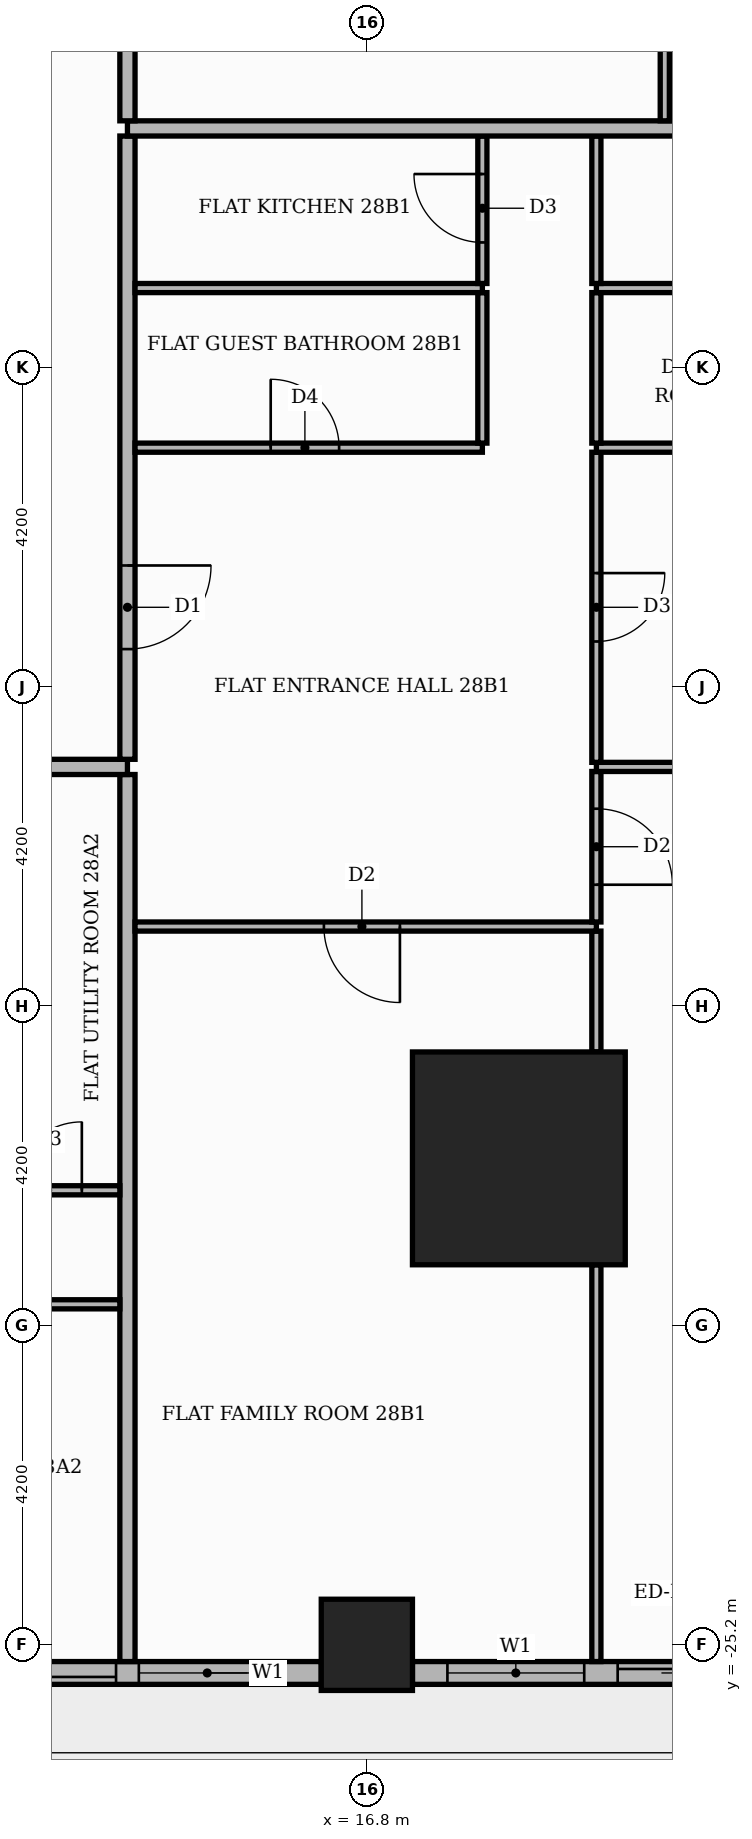
"""IFC4 building model, lengths in metres.
Left out: names, types, materials, properties, quantities, classifications, styles, units other than length and angle.
Written with IfcOpenShell. Run it as: python <this file> out.ifc"""

import sys

from ifc_helpers import new_model, si_unit, direction, frame, frame_2d, origin, origin_2d, place, context, subcontext, project, spatial, rectangle, extrude, element, fill, save


model = new_model("IFC4")
c1 = context("Model", 3, precision=1e-05, world=origin(), true_north=direction((0.0, 1.0)))
c2 = subcontext(c1, "Body", "Model", "MODEL_VIEW")
j1 = project(units=[si_unit("LENGTHUNIT", "METRE"), si_unit("PLANEANGLEUNIT", "RADIAN")], contexts=[c1])
p1 = place(None, origin())
s1 = spatial("IfcSite", under=j1, at=p1, CompositionType="ELEMENT")
p2 = place(p1, origin())
s2 = spatial("IfcBuilding", under=s1, at=p2, CompositionType="ELEMENT")
p3 = place(p2, frame((0.0, 0.0, 118.2)))
s3 = spatial("IfcBuildingStorey", under=s2, at=p3, CompositionType="ELEMENT", Elevation=118.2)
p4 = place(p3, frame((18.8, -18.8, 0.0), z_axis=(0.0, 0.0, 1.0), x_axis=(1.0, 0.0, 0.0)))
e1 = element("IfcColumn", 1, at=p4, inside=s3, PredefinedType="COLUMN", context=c2, shape_type="SweptSolid", body=[
    extrude(rectangle(XDim=2.8, YDim=2.8, at=origin_2d()), origin(), (0.0, 0.0, 1.0), 3.9),
])
p5 = place(p3, frame((16.8, -25.2, 0.0), z_axis=(0.0, 0.0, 1.0), x_axis=(1.0, 0.0, 0.0)))
e2 = element("IfcColumn", 2, at=p5, inside=s3, PredefinedType="COLUMN", context=c2, shape_type="SweptSolid", body=[
    extrude(rectangle(XDim=1.2, YDim=1.2, at=origin_2d()), origin(), (0.0, 0.0, 1.0), 3.9),
])
p6 = place(p3, frame((9.0, -25.57, 0.0), z_axis=(0.0, 0.0, 1.0), x_axis=(1.0, 0.0, 0.0)))
e3 = element("IfcWall", 3, at=p6, inside=s3, PredefinedType="STANDARD", context=c2, shape_type="SweptSolid", body=[
    extrude(rectangle(XDim=7.2, YDim=0.3, at=frame_2d((3.6, 0.0))), origin(), (0.0, 0.0, 1.0), 3.48),
])
p7 = place(p6, frame((0.6, 0.0, 0.0)))
e4 = element("IfcOpeningElement", 4, at=p7, cuts=e3, PredefinedType="OPENING", context=c2, shape_type="SweptSolid", body=[
    extrude(rectangle(XDim=3.9, YDim=2.4, at=frame_2d((1.95, 1.2))), frame((0.0, 0.16, 0.0), z_axis=(0.0, -1.0, 0.0), x_axis=(1.0, 0.0, 0.0)), (0.0, 0.0, 1.0), 0.32),
])
p8 = place(p6, frame((4.8, 0.0, 0.9)))
e5 = element("IfcOpeningElement", 5, at=p8, cuts=e3, PredefinedType="OPENING", context=c2, shape_type="SweptSolid", body=[
    extrude(rectangle(XDim=1.8, YDim=2.1, at=frame_2d((0.9, 1.05))), frame((0.0, 0.16, 0.0), z_axis=(0.0, -1.0, 0.0), x_axis=(1.0, 0.0, 0.0)), (0.0, 0.0, 1.0), 0.32),
])
p9 = place(p3, frame((17.4, -25.57, 0.0), z_axis=(0.0, 0.0, 1.0), x_axis=(1.0, 0.0, 0.0)))
e6 = element("IfcWall", 6, at=p9, inside=s3, PredefinedType="STANDARD", context=c2, shape_type="SweptSolid", body=[
    extrude(rectangle(XDim=4.82, YDim=0.3, at=frame_2d((2.41, 0.0))), origin(), (0.0, 0.0, 1.0), 3.48),
])
p10 = place(p9, frame((2.7, 0.0, 0.0)))
e7 = element("IfcOpeningElement", 7, at=p10, cuts=e6, PredefinedType="OPENING", context=c2, shape_type="SweptSolid", body=[
    extrude(rectangle(XDim=1.8, YDim=2.4, at=frame_2d((0.9, 1.2))), frame((0.0, 0.16, 0.0), z_axis=(0.0, -1.0, 0.0), x_axis=(1.0, 0.0, 0.0)), (0.0, 0.0, 1.0), 0.32),
])
p11 = place(p9, frame((0.46, 0.0, 0.9)))
e8 = element("IfcOpeningElement", 8, at=p11, cuts=e6, PredefinedType="OPENING", context=c2, shape_type="SweptSolid", body=[
    extrude(rectangle(XDim=1.8, YDim=2.1, at=frame_2d((0.9, 1.05))), frame((0.0, 0.16, 0.0), z_axis=(0.0, -1.0, 0.0), x_axis=(1.0, 0.0, 0.0)), (0.0, 0.0, 1.0), 0.32),
])
p12 = place(p3, frame((13.65, -25.42, 0.0), z_axis=(0.0, 0.0, 1.0), x_axis=(0.0, 1.0, 0.0)))
e9 = element("IfcWall", 9, at=p12, inside=s3, PredefinedType="PARTITIONING", context=c2, shape_type="SweptSolid", body=[
    extrude(rectangle(XDim=11.67, YDim=0.2, at=frame_2d((5.835, 0.0))), origin(), (0.0, 0.0, 1.0), 3.48),
])
p13 = place(p3, frame((19.82, -25.42, 0.0), z_axis=(0.0, 0.0, 1.0), x_axis=(0.0, 1.0, 0.0)))
e10 = element("IfcWall", 10, at=p13, inside=s3, PredefinedType="PARTITIONING", context=c2, shape_type="SweptSolid", body=[
    extrude(rectangle(XDim=5.22, YDim=0.12, at=frame_2d((2.61, 0.0))), origin(), (0.0, 0.0, 1.0), 3.48),
])
p14 = place(p3, frame((-5.15, -20.72, 0.0), z_axis=(0.0, 0.0, 1.0), x_axis=(1.0, 0.0, 0.0)))
e11 = element("IfcWall", 11, at=p14, inside=s3, PredefinedType="PARTITIONING", context=c2, shape_type="SweptSolid", body=[
    extrude(rectangle(XDim=18.7, YDim=0.12, at=frame_2d((9.35, 0.0))), origin(), (0.0, 0.0, 1.0), 3.48),
])
p15 = place(p14, frame((3.65, 0.0, 0.0)))
e12 = element("IfcOpeningElement", 12, at=p15, cuts=e11, PredefinedType="OPENING", context=c2, shape_type="SweptSolid", body=[
    extrude(rectangle(XDim=0.9, YDim=2.1, at=frame_2d((0.45, 1.05))), frame((0.0, 0.07, 0.0), z_axis=(0.0, -1.0, 0.0), x_axis=(1.0, 0.0, 0.0)), (0.0, 0.0, 1.0), 0.14),
])
p16 = place(p14, frame((15.15, 0.0, 0.0)))
e13 = element("IfcOpeningElement", 13, at=p16, cuts=e11, PredefinedType="OPENING", context=c2, shape_type="SweptSolid", body=[
    extrude(rectangle(XDim=1.0, YDim=2.1, at=frame_2d((0.5, 1.05))), frame((0.0, 0.07, 0.0), z_axis=(0.0, -1.0, 0.0), x_axis=(1.0, 0.0, 0.0)), (0.0, 0.0, 1.0), 0.14),
])
p17 = place(p3, frame((3.15, -19.22, 0.0), z_axis=(0.0, 0.0, 1.0), x_axis=(1.0, 0.0, 0.0)))
e14 = element("IfcWall", 14, at=p17, inside=s3, PredefinedType="PARTITIONING", context=c2, shape_type="SweptSolid", body=[
    extrude(rectangle(XDim=10.4, YDim=0.12, at=frame_2d((5.2, 0.0))), origin(), (0.0, 0.0, 1.0), 3.48),
])
p18 = place(p17, frame((2.7, 0.0, 0.0)))
e15 = element("IfcOpeningElement", 15, at=p18, cuts=e14, PredefinedType="OPENING", context=c2, shape_type="SweptSolid", body=[
    extrude(rectangle(XDim=0.9, YDim=2.1, at=frame_2d((0.45, 1.05))), frame((0.0, 0.07, 0.0), z_axis=(0.0, -1.0, 0.0), x_axis=(1.0, 0.0, 0.0)), (0.0, 0.0, 1.0), 0.14),
])
p19 = place(p17, frame((6.9, 0.0, 0.0)))
e16 = element("IfcOpeningElement", 16, at=p19, cuts=e14, PredefinedType="OPENING", context=c2, shape_type="SweptSolid", body=[
    extrude(rectangle(XDim=0.9, YDim=2.1, at=frame_2d((0.45, 1.05))), frame((0.0, 0.07, 0.0), z_axis=(0.0, -1.0, 0.0), x_axis=(1.0, 0.0, 0.0)), (0.0, 0.0, 1.0), 0.14),
])
p20 = place(p17, frame((9.0, 0.0, 0.0)))
e17 = element("IfcOpeningElement", 17, at=p20, cuts=e14, PredefinedType="OPENING", context=c2, shape_type="SweptSolid", body=[
    extrude(rectangle(XDim=0.9, YDim=2.1, at=frame_2d((0.45, 1.05))), frame((0.0, 0.07, 0.0), z_axis=(0.0, -1.0, 0.0), x_axis=(1.0, 0.0, 0.0)), (0.0, 0.0, 1.0), 0.14),
])
p21 = place(p3, frame((19.82, -17.4, 0.0), z_axis=(0.0, 0.0, 1.0), x_axis=(0.0, 1.0, 0.0)))
e18 = element("IfcWall", 18, at=p21, inside=s3, PredefinedType="PARTITIONING", context=c2, shape_type="SweptSolid", body=[
    extrude(rectangle(XDim=1.59, YDim=0.12, at=frame_2d((0.795, 0.0))), origin(), (0.0, 0.0, 1.0), 3.48),
])
p22 = place(p3, frame((13.75, -15.75, 0.0), z_axis=(0.0, 0.0, 1.0), x_axis=(1.0, 0.0, 0.0)))
e19 = element("IfcWall", 19, at=p22, inside=s3, PredefinedType="PARTITIONING", context=c2, shape_type="SweptSolid", body=[
    extrude(rectangle(XDim=6.07, YDim=0.12, at=frame_2d((3.035, 0.0))), origin(), (0.0, 0.0, 1.0), 3.48),
])
p23 = place(p22, frame((2.485, 0.0, 0.0)))
e20 = element("IfcOpeningElement", 20, at=p23, cuts=e19, PredefinedType="OPENING", context=c2, shape_type="SweptSolid", body=[
    extrude(rectangle(XDim=1.0, YDim=2.1, at=frame_2d((0.5, 1.05))), frame((0.0, 0.07, 0.0), z_axis=(0.0, -1.0, 0.0), x_axis=(1.0, 0.0, 0.0)), (0.0, 0.0, 1.0), 0.14),
])
p24 = place(p3, frame((19.82, -15.69, 0.0), z_axis=(0.0, 0.0, 1.0), x_axis=(0.0, 1.0, 0.0)))
e21 = element("IfcWall", 21, at=p24, inside=s3, PredefinedType="PARTITIONING", context=c2, shape_type="SweptSolid", body=[
    extrude(rectangle(XDim=1.98, YDim=0.12, at=frame_2d((0.99, 0.0))), origin(), (0.0, 0.0, 1.0), 3.48),
])
p25 = place(p24, frame((0.49, 0.0, 0.0)))
e22 = element("IfcOpeningElement", 22, at=p25, cuts=e21, PredefinedType="OPENING", context=c2, shape_type="SweptSolid", body=[
    extrude(rectangle(XDim=1.0, YDim=2.1, at=frame_2d((0.5, 1.05))), frame((0.0, 0.07, 0.0), z_axis=(0.0, -1.0, 0.0), x_axis=(1.0, 0.0, 0.0)), (0.0, 0.0, 1.0), 0.14),
])
p26 = place(p3, frame((-20.42, -13.65, 0.0), z_axis=(0.0, 0.0, 1.0), x_axis=(1.0, 0.0, 0.0)))
e23 = element("IfcWall", 23, at=p26, inside=s3, PredefinedType="PARTITIONING", context=c2, shape_type="SweptSolid", body=[
    extrude(rectangle(XDim=34.07, YDim=0.2, at=frame_2d((17.035, 0.0))), origin(), (0.0, 0.0, 1.0), 3.48),
])
p27 = place(p26, frame((8.32, 0.0, 0.0)))
e24 = element("IfcOpeningElement", 24, at=p27, cuts=e23, PredefinedType="OPENING", context=c2, shape_type="SweptSolid", body=[
    extrude(rectangle(XDim=1.1, YDim=2.4, at=frame_2d((0.55, 1.2))), frame((0.0, 0.11, 0.0), z_axis=(0.0, -1.0, 0.0), x_axis=(1.0, 0.0, 0.0)), (0.0, 0.0, 1.0), 0.22),
])
p28 = place(p26, frame((20.92, 0.0, 0.0)))
e25 = element("IfcOpeningElement", 25, at=p28, cuts=e23, PredefinedType="OPENING", context=c2, shape_type="SweptSolid", body=[
    extrude(rectangle(XDim=1.1, YDim=2.4, at=frame_2d((0.55, 1.2))), frame((0.0, 0.11, 0.0), z_axis=(0.0, -1.0, 0.0), x_axis=(1.0, 0.0, 0.0)), (0.0, 0.0, 1.0), 0.22),
])
p29 = place(p3, frame((19.82, -13.65, 0.0), z_axis=(0.0, 0.0, 1.0), x_axis=(1.0, 0.0, 0.0)))
e26 = element("IfcWall", 26, at=p29, inside=s3, PredefinedType="PARTITIONING", context=c2, shape_type="SweptSolid", body=[
    extrude(rectangle(XDim=5.6, YDim=0.12, at=frame_2d((2.8, 0.0))), origin(), (0.0, 0.0, 1.0), 3.48),
])
p30 = place(p3, frame((19.82, -13.59, 0.0), z_axis=(0.0, 0.0, 1.0), x_axis=(0.0, 1.0, 0.0)))
e27 = element("IfcWall", 27, at=p30, inside=s3, PredefinedType="PARTITIONING", context=c2, shape_type="SweptSolid", body=[
    extrude(rectangle(XDim=4.08, YDim=0.12, at=frame_2d((2.04, 0.0))), origin(), (0.0, 0.0, 1.0), 3.48),
])
p31 = place(p30, frame((1.59, 0.0, 0.0)))
e28 = element("IfcOpeningElement", 28, at=p31, cuts=e27, PredefinedType="OPENING", context=c2, shape_type="SweptSolid", body=[
    extrude(rectangle(XDim=0.9, YDim=2.1, at=frame_2d((0.45, 1.05))), frame((0.0, 0.07, 0.0), z_axis=(0.0, -1.0, 0.0), x_axis=(1.0, 0.0, 0.0)), (0.0, 0.0, 1.0), 0.14),
])
p32 = place(p3, frame((13.65, -13.55, 0.0), z_axis=(0.0, 0.0, 1.0), x_axis=(0.0, 1.0, 0.0)))
e29 = element("IfcWall", 29, at=p32, inside=s3, PredefinedType="PARTITIONING", context=c2, shape_type="SweptSolid", body=[
    extrude(rectangle(XDim=8.2, YDim=0.2, at=frame_2d((4.1, 0.0))), origin(), (0.0, 0.0, 1.0), 3.48),
])
p33 = place(p32, frame((1.45, 0.0, 0.0)))
e30 = element("IfcOpeningElement", 30, at=p33, cuts=e29, PredefinedType="OPENING", context=c2, shape_type="SweptSolid", body=[
    extrude(rectangle(XDim=1.1, YDim=2.4, at=frame_2d((0.55, 1.2))), frame((0.0, 0.11, 0.0), z_axis=(0.0, -1.0, 0.0), x_axis=(1.0, 0.0, 0.0)), (0.0, 0.0, 1.0), 0.22),
])
p34 = place(p3, frame((13.75, -9.45, 0.0), z_axis=(0.0, 0.0, 1.0), x_axis=(1.0, 0.0, 0.0)))
e31 = element("IfcWall", 31, at=p34, inside=s3, PredefinedType="PARTITIONING", context=c2, shape_type="SweptSolid", body=[
    extrude(rectangle(XDim=4.57, YDim=0.12, at=frame_2d((2.285, 0.0))), origin(), (0.0, 0.0, 1.0), 3.48),
])
p35 = place(p34, frame((1.785, 0.0, 0.0)))
e32 = element("IfcOpeningElement", 32, at=p35, cuts=e31, PredefinedType="OPENING", context=c2, shape_type="SweptSolid", body=[
    extrude(rectangle(XDim=0.9, YDim=2.1, at=frame_2d((0.45, 1.05))), frame((0.0, 0.07, 0.0), z_axis=(0.0, -1.0, 0.0), x_axis=(1.0, 0.0, 0.0)), (0.0, 0.0, 1.0), 0.14),
])
p36 = place(p3, frame((19.82, -9.45, 0.0), z_axis=(0.0, 0.0, 1.0), x_axis=(1.0, 0.0, 0.0)))
e33 = element("IfcWall", 33, at=p36, inside=s3, PredefinedType="PARTITIONING", context=c2, shape_type="SweptSolid", body=[
    extrude(rectangle(XDim=5.6, YDim=0.12, at=frame_2d((2.8, 0.0))), origin(), (0.0, 0.0, 1.0), 3.48),
])
p37 = place(p36, frame((2.5, 0.0, 0.0)))
e34 = element("IfcOpeningElement", 34, at=p37, cuts=e33, PredefinedType="OPENING", context=c2, shape_type="SweptSolid", body=[
    extrude(rectangle(XDim=0.9, YDim=2.1, at=frame_2d((0.45, 1.05))), frame((0.0, 0.07, 0.0), z_axis=(0.0, -1.0, 0.0), x_axis=(1.0, 0.0, 0.0)), (0.0, 0.0, 1.0), 0.14),
])
for number, where, z_axis, x_axis in (
    (35, (18.32, -9.39, 0.0), (0.0, 0.0, 1.0), (0.0, 1.0, 0.0)),
    (36, (19.82, -9.39, 0.0), (0.0, 0.0, 1.0), (0.0, 1.0, 0.0)),
):
    element("IfcWall", number, at=place(p3, frame(where, z_axis=z_axis, x_axis=x_axis)), inside=s3, PredefinedType="PARTITIONING", context=c2, shape_type="SweptSolid", body=[
        extrude(rectangle(XDim=1.98, YDim=0.12, at=frame_2d((0.99, 0.0))), origin(), (0.0, 0.0, 1.0), 3.48),
    ])
p38 = place(p3, frame((13.75, -7.35, 0.0), z_axis=(0.0, 0.0, 1.0), x_axis=(1.0, 0.0, 0.0)))
e37 = element("IfcWall", 37, at=p38, inside=s3, PredefinedType="PARTITIONING", context=c2, shape_type="SweptSolid", body=[
    extrude(rectangle(XDim=4.57, YDim=0.12, at=frame_2d((2.285, 0.0))), origin(), (0.0, 0.0, 1.0), 3.48),
])
p39 = place(p3, frame((19.82, -7.35, 0.0), z_axis=(0.0, 0.0, 1.0), x_axis=(1.0, 0.0, 0.0)))
e38 = element("IfcWall", 38, at=p39, inside=s3, PredefinedType="PARTITIONING", context=c2, shape_type="SweptSolid", body=[
    extrude(rectangle(XDim=5.6, YDim=0.12, at=frame_2d((2.8, 0.0))), origin(), (0.0, 0.0, 1.0), 3.48),
])
p40 = place(p39, frame((2.5, 0.0, 0.0)))
e39 = element("IfcOpeningElement", 39, at=p40, cuts=e38, PredefinedType="OPENING", context=c2, shape_type="SweptSolid", body=[
    extrude(rectangle(XDim=0.9, YDim=2.1, at=frame_2d((0.45, 1.05))), frame((0.0, 0.07, 0.0), z_axis=(0.0, -1.0, 0.0), x_axis=(1.0, 0.0, 0.0)), (0.0, 0.0, 1.0), 0.14),
])
p41 = place(p3, frame((18.32, -7.29, 0.0), z_axis=(0.0, 0.0, 1.0), x_axis=(0.0, 1.0, 0.0)))
e40 = element("IfcWall", 40, at=p41, inside=s3, PredefinedType="PARTITIONING", context=c2, shape_type="SweptSolid", body=[
    extrude(rectangle(XDim=1.94, YDim=0.12, at=frame_2d((0.97, 0.0))), origin(), (0.0, 0.0, 1.0), 3.48),
])
p42 = place(p41, frame((0.54, 0.0, 0.0)))
e41 = element("IfcOpeningElement", 41, at=p42, cuts=e40, PredefinedType="OPENING", context=c2, shape_type="SweptSolid", body=[
    extrude(rectangle(XDim=0.9, YDim=2.1, at=frame_2d((0.45, 1.05))), frame((0.0, 0.07, 0.0), z_axis=(0.0, -1.0, 0.0), x_axis=(1.0, 0.0, 0.0)), (0.0, 0.0, 1.0), 0.14),
])
p43 = place(p3, frame((19.82, -7.29, 0.0), z_axis=(0.0, 0.0, 1.0), x_axis=(0.0, 1.0, 0.0)))
e42 = element("IfcWall", 42, at=p43, inside=s3, PredefinedType="PARTITIONING", context=c2, shape_type="SweptSolid", body=[
    extrude(rectangle(XDim=1.94, YDim=0.12, at=frame_2d((0.97, 0.0))), origin(), (0.0, 0.0, 1.0), 3.48),
])
p44 = place(p3, frame((13.65, -5.25, 0.0), z_axis=(0.0, 0.0, 1.0), x_axis=(1.0, 0.0, 0.0)))
e43 = element("IfcWall", 43, at=p44, inside=s3, PredefinedType="PARTITIONING", context=c2, shape_type="SweptSolid", body=[
    extrude(rectangle(XDim=11.77, YDim=0.2, at=frame_2d((5.885, 0.0))), origin(), (0.0, 0.0, 1.0), 3.48),
])
p45 = place(p3, frame((13.65, -5.15, 0.0), z_axis=(0.0, 0.0, 1.0), x_axis=(0.0, 1.0, 0.0)))
e44 = element("IfcWall", 44, at=p45, inside=s3, PredefinedType="PARTITIONING", context=c2, shape_type="SweptSolid", body=[
    extrude(rectangle(XDim=18.7, YDim=0.2, at=frame_2d((9.35, 0.0))), origin(), (0.0, 0.0, 1.0), 3.48),
])
p46 = place(p45, frame((1.45, 0.0, 0.0)))
e45 = element("IfcOpeningElement", 45, at=p46, cuts=e44, PredefinedType="OPENING", context=c2, shape_type="SweptSolid", body=[
    extrude(rectangle(XDim=1.1, YDim=2.4, at=frame_2d((0.55, 1.2))), frame((0.0, 0.11, 0.0), z_axis=(0.0, -1.0, 0.0), x_axis=(1.0, 0.0, 0.0)), (0.0, 0.0, 1.0), 0.22),
])
p47 = place(p3, frame((20.72, -5.15, 0.0), z_axis=(0.0, 0.0, 1.0), x_axis=(0.0, 1.0, 0.0)))
e46 = element("IfcWall", 46, at=p47, inside=s3, PredefinedType="PARTITIONING", context=c2, shape_type="SweptSolid", body=[
    extrude(rectangle(XDim=8.24, YDim=0.12, at=frame_2d((4.12, 0.0))), origin(), (0.0, 0.0, 1.0), 3.48),
])
p48 = place(p47, frame((3.65, 0.0, 0.0)))
e47 = element("IfcOpeningElement", 47, at=p48, cuts=e46, PredefinedType="OPENING", context=c2, shape_type="SweptSolid", body=[
    extrude(rectangle(XDim=0.9, YDim=2.1, at=frame_2d((0.45, 1.05))), frame((0.0, 0.07, 0.0), z_axis=(0.0, -1.0, 0.0), x_axis=(1.0, 0.0, 0.0)), (0.0, 0.0, 1.0), 0.14),
])
p49 = place(p7, origin())
e48 = element("IfcDoor", 48, at=p49, inside=s3, OperationType="SLIDING_TO_LEFT", PredefinedType="DOOR", context=c2, shape_type="SweptSolid", body=[
    extrude(rectangle(XDim=3.9, YDim=2.4, at=frame_2d((1.95, 1.2))), frame((0.0, 0.025, 0.0), z_axis=(0.0, -1.0, 0.0), x_axis=(1.0, 0.0, 0.0)), (0.0, 0.0, 1.0), 0.05),
])
fill(e4, e48)
p50 = place(p8, origin())
e49 = element("IfcWindow", 49, at=p50, inside=s3, PartitioningType="SINGLE_PANEL", PredefinedType="WINDOW", context=c2, shape_type="SweptSolid", body=[
    extrude(rectangle(XDim=1.8, YDim=2.1, at=frame_2d((0.9, 1.05))), frame((0.0, 0.03, 0.0), z_axis=(0.0, -1.0, 0.0), x_axis=(1.0, 0.0, 0.0)), (0.0, 0.0, 1.0), 0.06),
])
fill(e5, e49)
p51 = place(p10, origin())
e50 = element("IfcDoor", 50, at=p51, inside=s3, OperationType="SLIDING_TO_LEFT", PredefinedType="DOOR", context=c2, shape_type="SweptSolid", body=[
    extrude(rectangle(XDim=1.8, YDim=2.4, at=frame_2d((0.9, 1.2))), frame((0.0, 0.025, 0.0), z_axis=(0.0, -1.0, 0.0), x_axis=(1.0, 0.0, 0.0)), (0.0, 0.0, 1.0), 0.05),
])
fill(e7, e50)
p52 = place(p11, origin())
e51 = element("IfcWindow", 51, at=p52, inside=s3, PartitioningType="SINGLE_PANEL", PredefinedType="WINDOW", context=c2, shape_type="SweptSolid", body=[
    extrude(rectangle(XDim=1.8, YDim=2.1, at=frame_2d((0.9, 1.05))), frame((0.0, 0.03, 0.0), z_axis=(0.0, -1.0, 0.0), x_axis=(1.0, 0.0, 0.0)), (0.0, 0.0, 1.0), 0.06),
])
fill(e8, e51)
p53 = place(p20, origin())
e52 = element("IfcDoor", 52, at=p53, inside=s3, OperationType="SINGLE_SWING_RIGHT", PredefinedType="DOOR", context=c2, shape_type="SweptSolid", body=[
    extrude(rectangle(XDim=0.9, YDim=2.1, at=frame_2d((0.45, 1.05))), frame((0.0, 0.025, 0.0), z_axis=(0.0, -1.0, 0.0), x_axis=(1.0, 0.0, 0.0)), (0.0, 0.0, 1.0), 0.05),
])
fill(e17, e52)
p54 = place(p33, frame((1.1, 0.0, 0.0), z_axis=(0.0, 0.0, 1.0), x_axis=(-1.0, 0.0, 0.0)))
e53 = element("IfcDoor", 53, at=p54, inside=s3, OperationType="SINGLE_SWING_RIGHT", PredefinedType="DOOR", context=c2, shape_type="SweptSolid", body=[
    extrude(rectangle(XDim=1.1, YDim=2.4, at=frame_2d((0.55, 1.2))), frame((0.0, 0.025, 0.0), z_axis=(0.0, -1.0, 0.0), x_axis=(1.0, 0.0, 0.0)), (0.0, 0.0, 1.0), 0.05),
])
fill(e30, e53)
p55 = place(p23, frame((1.0, 0.0, 0.0), z_axis=(0.0, 0.0, 1.0), x_axis=(-1.0, 0.0, 0.0)))
e54 = element("IfcDoor", 54, at=p55, inside=s3, OperationType="SINGLE_SWING_RIGHT", PredefinedType="DOOR", context=c2, shape_type="SweptSolid", body=[
    extrude(rectangle(XDim=1.0, YDim=2.1, at=frame_2d((0.5, 1.05))), frame((0.0, 0.025, 0.0), z_axis=(0.0, -1.0, 0.0), x_axis=(1.0, 0.0, 0.0)), (0.0, 0.0, 1.0), 0.05),
])
fill(e20, e54)
p56 = place(p35, origin())
e55 = element("IfcDoor", 55, at=p56, inside=s3, OperationType="SINGLE_SWING_LEFT", PredefinedType="DOOR", context=c2, shape_type="SweptSolid", body=[
    extrude(rectangle(XDim=0.9, YDim=2.1, at=frame_2d((0.45, 1.05))), frame((0.0, 0.025, 0.0), z_axis=(0.0, -1.0, 0.0), x_axis=(1.0, 0.0, 0.0)), (0.0, 0.0, 1.0), 0.05),
])
fill(e32, e55)
p57 = place(p42, origin())
e56 = element("IfcDoor", 56, at=p57, inside=s3, OperationType="SINGLE_SWING_RIGHT", PredefinedType="DOOR", context=c2, shape_type="SweptSolid", body=[
    extrude(rectangle(XDim=0.9, YDim=2.1, at=frame_2d((0.45, 1.05))), frame((0.0, 0.025, 0.0), z_axis=(0.0, -1.0, 0.0), x_axis=(1.0, 0.0, 0.0)), (0.0, 0.0, 1.0), 0.05),
])
fill(e41, e56)
p58 = place(p25, frame((1.0, 0.0, 0.0), z_axis=(0.0, 0.0, 1.0), x_axis=(-1.0, 0.0, 0.0)))
e57 = element("IfcDoor", 57, at=p58, inside=s3, OperationType="SINGLE_SWING_LEFT", PredefinedType="DOOR", context=c2, shape_type="SweptSolid", body=[
    extrude(rectangle(XDim=1.0, YDim=2.1, at=frame_2d((0.5, 1.05))), frame((0.0, 0.025, 0.0), z_axis=(0.0, -1.0, 0.0), x_axis=(1.0, 0.0, 0.0)), (0.0, 0.0, 1.0), 0.05),
])
fill(e22, e57)
p59 = place(p31, frame((0.9, 0.0, 0.0), z_axis=(0.0, 0.0, 1.0), x_axis=(-1.0, 0.0, 0.0)))
e58 = element("IfcDoor", 58, at=p59, inside=s3, OperationType="SINGLE_SWING_RIGHT", PredefinedType="DOOR", context=c2, shape_type="SweptSolid", body=[
    extrude(rectangle(XDim=0.9, YDim=2.1, at=frame_2d((0.45, 1.05))), frame((0.0, 0.025, 0.0), z_axis=(0.0, -1.0, 0.0), x_axis=(1.0, 0.0, 0.0)), (0.0, 0.0, 1.0), 0.05),
])
fill(e28, e58)
save(model, sys.argv[1])
